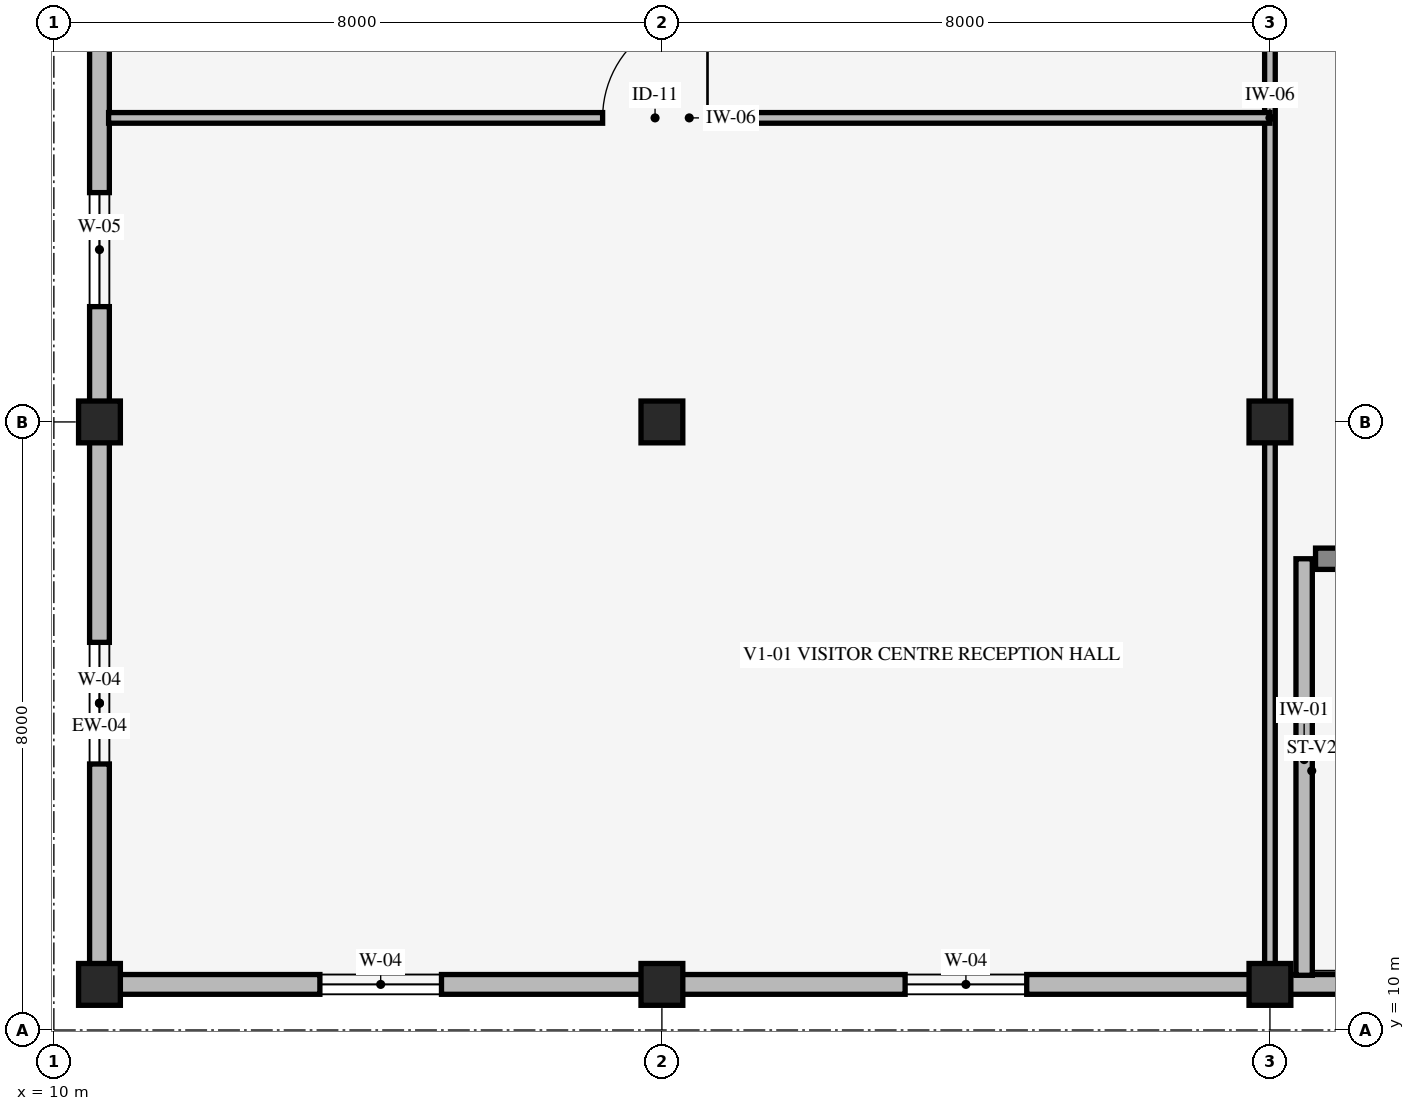
"""IFC4 building model, lengths in metres.
Left out: names, types, materials, properties, quantities, classifications, styles, units other than length and angle.
Written with IfcOpenShell. Run it as: python <this file> out.ifc"""

import sys

from ifc_helpers import new_model, si_unit, direction, frame, frame_2d, origin, origin_2d, place, context, subcontext, project, spatial, rectangle, extrude, element, fill, save


model = new_model("IFC4")
c1 = context("Model", 3, precision=1e-05, world=origin(), true_north=direction((0.0, 1.0)))
c2 = subcontext(c1, "Body", "Model", "MODEL_VIEW")
j1 = project(units=[si_unit("LENGTHUNIT", "METRE"), si_unit("PLANEANGLEUNIT", "RADIAN")], contexts=[c1])
p1 = place(None, origin())
s1 = spatial("IfcSite", under=j1, at=p1, CompositionType="ELEMENT")
p2 = place(p1, origin())
s2 = spatial("IfcBuilding", under=s1, at=p2, CompositionType="ELEMENT")
p3 = place(p2, origin())
s3 = spatial("IfcBuildingStorey", under=s2, at=p3, CompositionType="ELEMENT", Elevation=0.0)
for number, where, z_axis, x_axis in (
    (1, (10.6, 10.6, -0.28), (0.0, 0.0, 1.0), (1.0, 0.0, 0.0)),
    (2, (10.6, 18.0, -0.28), (0.0, 0.0, 1.0), (1.0, 0.0, 0.0)),
    (3, (18.0, 10.6, -0.28), (0.0, 0.0, 1.0), (1.0, 0.0, 0.0)),
    (4, (18.0, 18.0, -0.28), (0.0, 0.0, 1.0), (1.0, 0.0, 0.0)),
    (5, (26.0, 10.6, -0.28), (0.0, 0.0, 1.0), (1.0, 0.0, 0.0)),
    (6, (26.0, 18.0, -0.28), (0.0, 0.0, 1.0), (1.0, 0.0, 0.0)),
):
    element("IfcColumn", number, at=place(p3, frame(where, z_axis=z_axis, x_axis=x_axis)), inside=s3, PredefinedType="COLUMN", context=c2, shape_type="SweptSolid", body=[
        extrude(rectangle(XDim=0.55, YDim=0.55, at=origin_2d()), origin(), (0.0, 0.0, 1.0), 5.68),
    ])
p4 = place(p3, frame((34.0, 10.6, 0.0), z_axis=(0.0, 0.0, 1.0), x_axis=(-1.0, 0.0, 0.0)))
e7 = element("IfcWall", 7, at=p4, inside=s3, PredefinedType="STANDARD", context=c2, shape_type="SweptSolid", body=[
    extrude(rectangle(XDim=8.0, YDim=0.26, at=frame_2d((4.0, 0.0))), origin(), (0.0, 0.0, 1.0), 4.18),
])
p5 = place(p4, frame((2.9, 0.0, 0.85)))
e8 = element("IfcOpeningElement", 8, at=p5, cuts=e7, PredefinedType="OPENING", context=c2, shape_type="SweptSolid", body=[
    extrude(rectangle(XDim=1.6, YDim=1.2, at=frame_2d((0.8, 0.6))), frame((0.0, 0.14, 0.0), z_axis=(0.0, -1.0, 0.0), x_axis=(1.0, 0.0, 0.0)), (0.0, 0.0, 1.0), 0.28),
])
p6 = place(p3, frame((26.0, 10.6, 0.0), z_axis=(0.0, 0.0, 1.0), x_axis=(-1.0, 0.0, 0.0)))
e9 = element("IfcWall", 9, at=p6, inside=s3, PredefinedType="STANDARD", context=c2, shape_type="SweptSolid", body=[
    extrude(rectangle(XDim=8.0, YDim=0.26, at=frame_2d((4.0, 0.0))), origin(), (0.0, 0.0, 1.0), 4.18),
])
p7 = place(p6, frame((3.2, 0.0, 0.85)))
e10 = element("IfcOpeningElement", 10, at=p7, cuts=e9, PredefinedType="OPENING", context=c2, shape_type="SweptSolid", body=[
    extrude(rectangle(XDim=1.6, YDim=1.2, at=frame_2d((0.8, 0.6))), frame((0.0, 0.14, 0.0), z_axis=(0.0, -1.0, 0.0), x_axis=(1.0, 0.0, 0.0)), (0.0, 0.0, 1.0), 0.28),
])
p8 = place(p3, frame((18.0, 10.6, 0.0), z_axis=(0.0, 0.0, 1.0), x_axis=(-1.0, 0.0, 0.0)))
e11 = element("IfcWall", 11, at=p8, inside=s3, PredefinedType="STANDARD", context=c2, shape_type="SweptSolid", body=[
    extrude(rectangle(XDim=7.4, YDim=0.26, at=frame_2d((3.7, 0.0))), origin(), (0.0, 0.0, 1.0), 4.18),
])
p9 = place(p8, frame((2.9, 0.0, 0.85)))
e12 = element("IfcOpeningElement", 12, at=p9, cuts=e11, PredefinedType="OPENING", context=c2, shape_type="SweptSolid", body=[
    extrude(rectangle(XDim=1.6, YDim=1.2, at=frame_2d((0.8, 0.6))), frame((0.0, 0.14, 0.0), z_axis=(0.0, -1.0, 0.0), x_axis=(1.0, 0.0, 0.0)), (0.0, 0.0, 1.0), 0.28),
])
p10 = place(p3, frame((10.6, 10.6, 0.0), z_axis=(0.0, 0.0, 1.0), x_axis=(0.0, 1.0, 0.0)))
e13 = element("IfcWall", 13, at=p10, inside=s3, PredefinedType="STANDARD", context=c2, shape_type="SweptSolid", body=[
    extrude(rectangle(XDim=7.4, YDim=0.26, at=frame_2d((3.7, 0.0))), origin(), (0.0, 0.0, 1.0), 4.61),
])
p11 = place(p10, frame((2.9, 0.0, 0.85)))
e14 = element("IfcOpeningElement", 14, at=p11, cuts=e13, PredefinedType="OPENING", context=c2, shape_type="SweptSolid", body=[
    extrude(rectangle(XDim=1.6, YDim=1.2, at=frame_2d((0.8, 0.6))), frame((0.0, 0.14, 0.0), z_axis=(0.0, -1.0, 0.0), x_axis=(1.0, 0.0, 0.0)), (0.0, 0.0, 1.0), 0.28),
])
p12 = place(p3, frame((10.6, 18.0, 0.0), z_axis=(0.0, 0.0, 1.0), x_axis=(0.0, 1.0, 0.0)))
e15 = element("IfcWall", 15, at=p12, inside=s3, PredefinedType="STANDARD", context=c2, shape_type="SweptSolid", body=[
    extrude(rectangle(XDim=8.0, YDim=0.26, at=frame_2d((4.0, 0.0))), origin(), (0.0, 0.0, 1.0), 4.61),
])
p13 = place(p12, frame((1.517, 0.0, 0.85)))
e16 = element("IfcOpeningElement", 16, at=p13, cuts=e15, PredefinedType="OPENING", context=c2, shape_type="SweptSolid", body=[
    extrude(rectangle(XDim=1.5, YDim=1.5, at=frame_2d((0.75, 0.75))), frame((0.0, 0.14, 0.0), z_axis=(0.0, -1.0, 0.0), x_axis=(1.0, 0.0, 0.0)), (0.0, 0.0, 1.0), 0.28),
])
p14 = place(p3, frame((26.6, 16.2, 0.0), z_axis=(0.0, 0.0, 1.0), x_axis=(1.0, 0.0, 0.0)))
e17 = element("IfcWall", 17, at=p14, inside=s3, PredefinedType="SHEAR", context=c2, shape_type="SweptSolid", body=[
    extrude(rectangle(XDim=9.75, YDim=0.28, at=frame_2d((4.875, 0.0))), origin(), (0.0, 0.0, 1.0), 5.16),
])
p15 = place(p3, frame((26.45, 16.2, 0.0), z_axis=(0.0, 0.0, 1.0), x_axis=(0.0, -1.0, 0.0)))
e18 = element("IfcWall", 18, at=p15, inside=s3, PredefinedType="STANDARD", context=c2, shape_type="SweptSolid", body=[
    extrude(rectangle(XDim=5.48, YDim=0.215, at=frame_2d((2.74, 0.0))), origin(), (0.0, 0.0, 1.0), 4.59),
])
p16 = place(p3, frame((26.0, 10.65, 0.0), z_axis=(0.0, 0.0, 1.0), x_axis=(0.0, 1.0, 0.0)))
e19 = element("IfcWall", 19, at=p16, inside=s3, PredefinedType="STANDARD", context=c2, shape_type="SweptSolid", body=[
    extrude(rectangle(XDim=23.3, YDim=0.14, at=frame_2d((11.65, 0.0))), origin(), (0.0, 0.0, 1.0), 4.59),
])
p17 = place(p16, frame((18.5, 0.0, 0.0)))
e20 = element("IfcOpeningElement", 20, at=p17, cuts=e19, PredefinedType="OPENING", context=c2, shape_type="SweptSolid", body=[
    extrude(rectangle(XDim=1.54, YDim=2.22, at=frame_2d((0.77, 1.11))), frame((0.0, 0.08, 0.0), z_axis=(0.0, -1.0, 0.0), x_axis=(1.0, 0.0, 0.0)), (0.0, 0.0, 1.0), 0.16),
])
p18 = place(p3, frame((10.72, 22.0, 0.0), z_axis=(0.0, 0.0, 1.0), x_axis=(1.0, 0.0, 0.0)))
e21 = element("IfcWall", 21, at=p18, inside=s3, PredefinedType="STANDARD", context=c2, shape_type="SweptSolid", body=[
    extrude(rectangle(XDim=15.28, YDim=0.14, at=frame_2d((7.64, 0.0))), origin(), (0.0, 0.0, 1.0), 5.1),
])
p19 = place(p18, frame((6.5, 0.0, 0.0)))
e22 = element("IfcOpeningElement", 22, at=p19, cuts=e21, PredefinedType="OPENING", context=c2, shape_type="SweptSolid", body=[
    extrude(rectangle(XDim=1.38, YDim=2.16, at=frame_2d((0.69, 1.08))), frame((0.0, 0.08, 0.0), z_axis=(0.0, -1.0, 0.0), x_axis=(1.0, 0.0, 0.0)), (0.0, 0.0, 1.0), 0.16),
])
p20 = place(p7, origin())
e23 = element("IfcWindow", 23, at=p20, inside=s3, PartitioningType="SINGLE_PANEL", PredefinedType="WINDOW", context=c2, shape_type="SweptSolid", body=[
    extrude(rectangle(XDim=1.6, YDim=1.2, at=frame_2d((0.8, 0.6))), frame((0.0, 0.03, 0.0), z_axis=(0.0, -1.0, 0.0), x_axis=(1.0, 0.0, 0.0)), (0.0, 0.0, 1.0), 0.06),
])
fill(e10, e23)
p21 = place(p9, origin())
e24 = element("IfcWindow", 24, at=p21, inside=s3, PartitioningType="SINGLE_PANEL", PredefinedType="WINDOW", context=c2, shape_type="SweptSolid", body=[
    extrude(rectangle(XDim=1.6, YDim=1.2, at=frame_2d((0.8, 0.6))), frame((0.0, 0.03, 0.0), z_axis=(0.0, -1.0, 0.0), x_axis=(1.0, 0.0, 0.0)), (0.0, 0.0, 1.0), 0.06),
])
fill(e12, e24)
p22 = place(p11, origin())
e25 = element("IfcWindow", 25, at=p22, inside=s3, PartitioningType="SINGLE_PANEL", PredefinedType="WINDOW", context=c2, shape_type="SweptSolid", body=[
    extrude(rectangle(XDim=1.6, YDim=1.2, at=frame_2d((0.8, 0.6))), frame((0.0, 0.03, 0.0), z_axis=(0.0, -1.0, 0.0), x_axis=(1.0, 0.0, 0.0)), (0.0, 0.0, 1.0), 0.06),
])
fill(e14, e25)
p23 = place(p13, origin())
e26 = element("IfcWindow", 26, at=p23, inside=s3, PartitioningType="SINGLE_PANEL", PredefinedType="WINDOW", context=c2, shape_type="SweptSolid", body=[
    extrude(rectangle(XDim=1.5, YDim=1.5, at=frame_2d((0.75, 0.75))), frame((0.0, 0.03, 0.0), z_axis=(0.0, -1.0, 0.0), x_axis=(1.0, 0.0, 0.0)), (0.0, 0.0, 1.0), 0.06),
])
fill(e16, e26)
p24 = place(p19, origin())
e27 = element("IfcDoor", 27, at=p24, inside=s3, OperationType="SINGLE_SWING_RIGHT", PredefinedType="DOOR", context=c2, shape_type="SweptSolid", body=[
    extrude(rectangle(XDim=1.38, YDim=2.16, at=frame_2d((0.69, 1.08))), frame((0.0, 0.025, 0.0), z_axis=(0.0, -1.0, 0.0), x_axis=(1.0, 0.0, 0.0)), (0.0, 0.0, 1.0), 0.05),
])
fill(e22, e27)
save(model, sys.argv[1])
